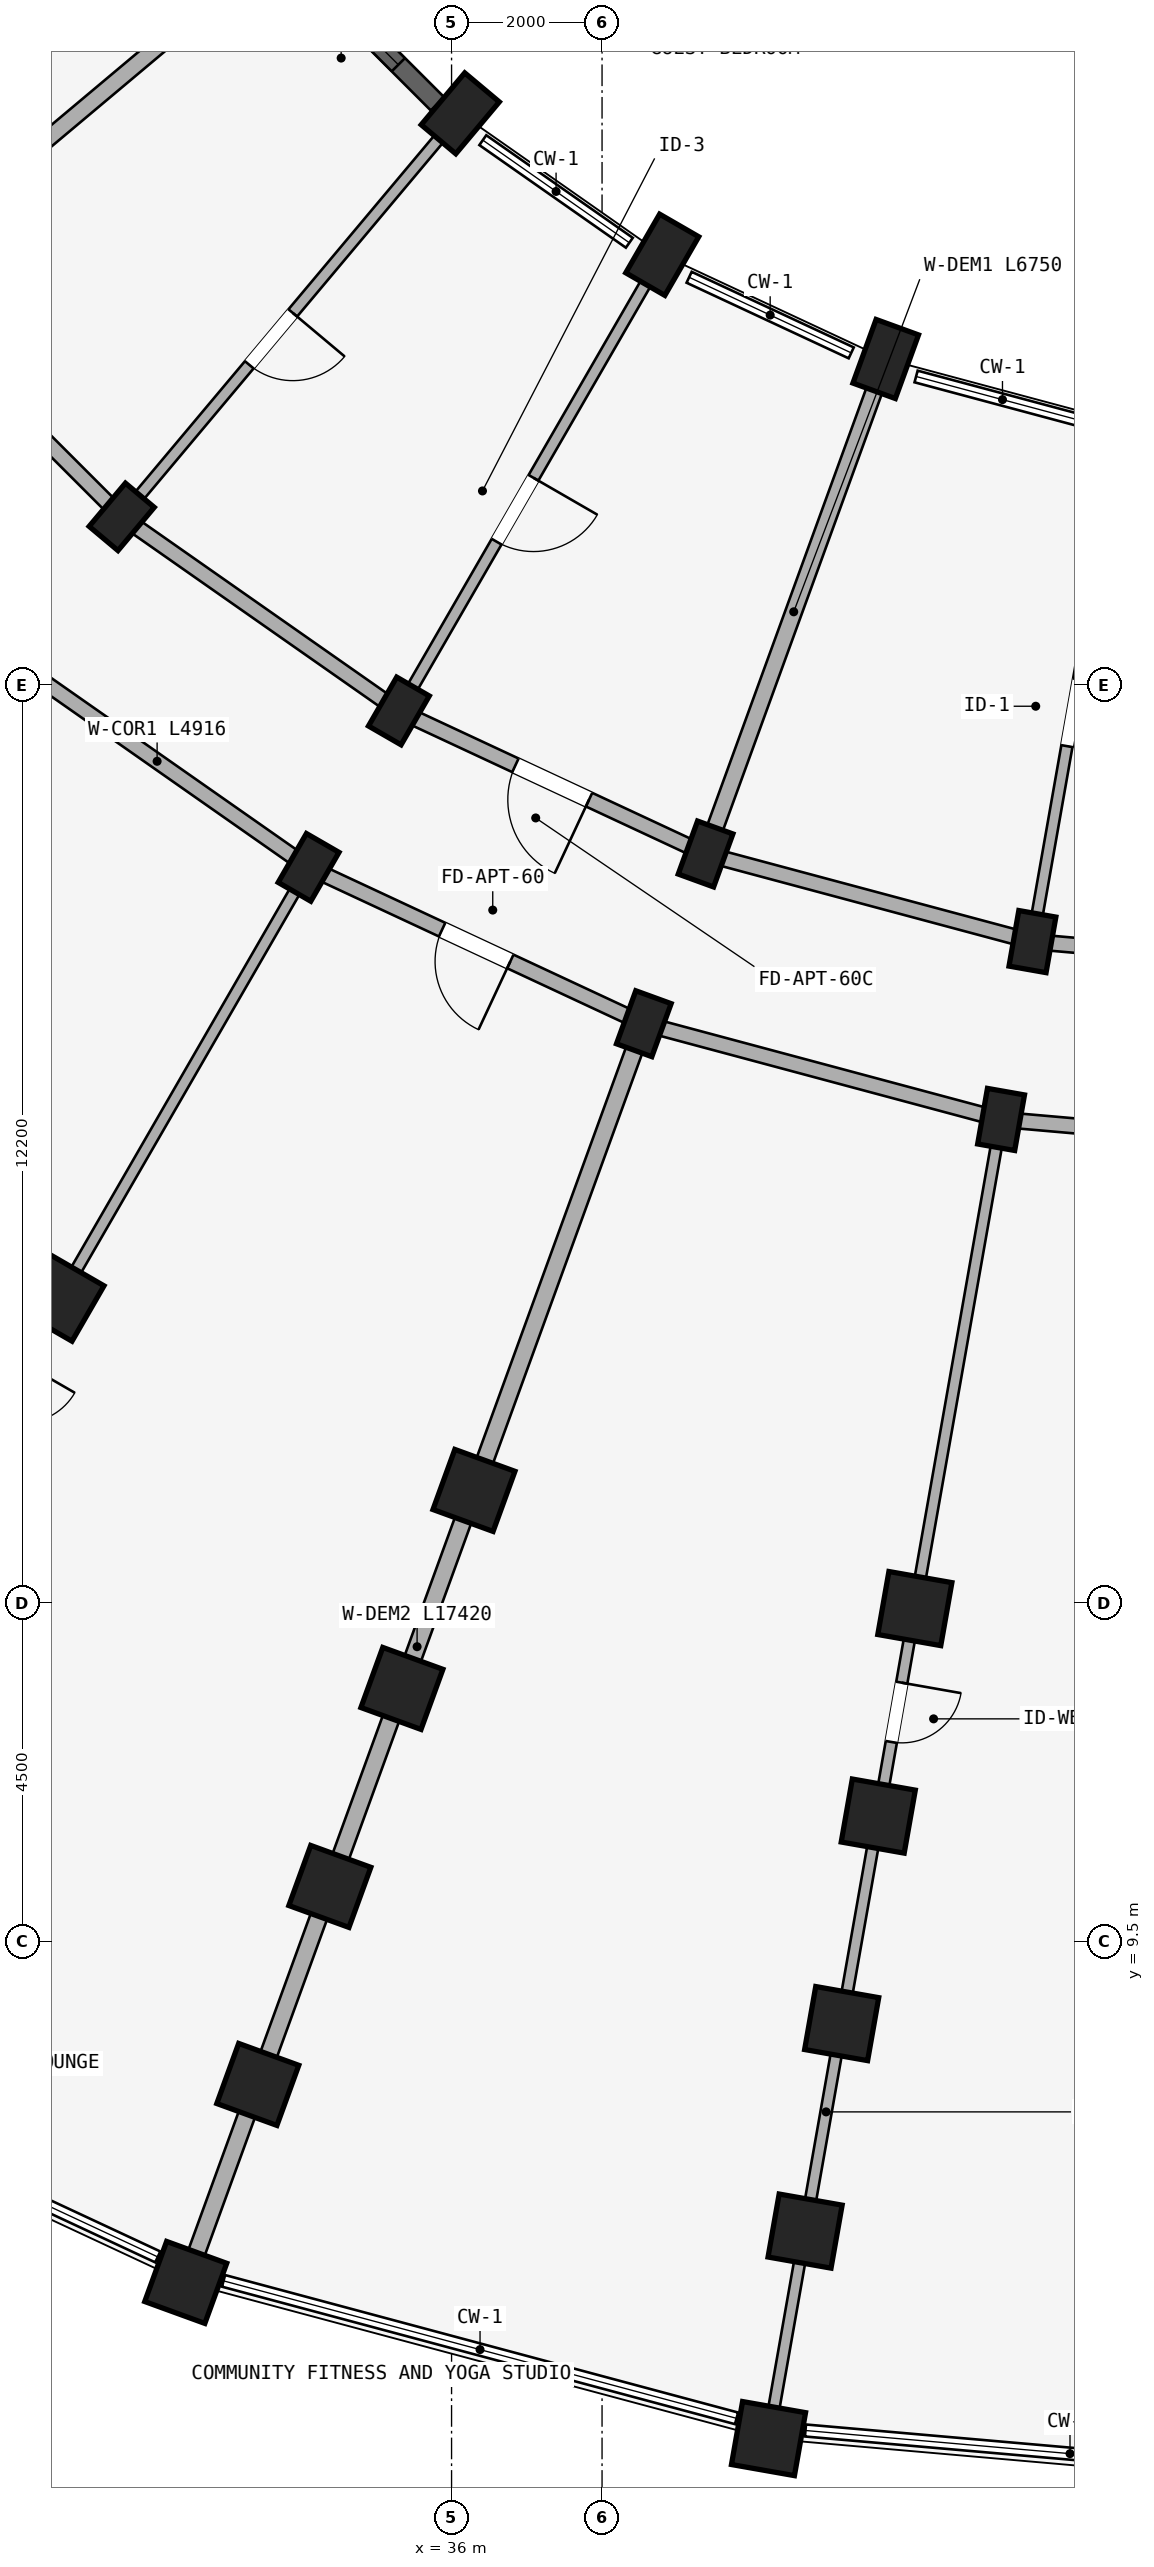
"""IFC4 building model, lengths in metres.
Left out: names, types, materials, properties, quantities, classifications, styles, units other than length and angle.
Written with IfcOpenShell. Run it as: python <this file> out.ifc"""

import sys

from ifc_helpers import new_model, si_unit, direction, frame, frame_2d, origin, origin_2d, place, context, subcontext, project, spatial, rectangle, extrude, element, fill, save


model = new_model("IFC4")
c1 = context("Model", 3, precision=1e-05, world=origin(), true_north=direction((0.0, 1.0)))
c2 = subcontext(c1, "Body", "Model", "MODEL_VIEW")
j1 = project(units=[si_unit("LENGTHUNIT", "METRE"), si_unit("PLANEANGLEUNIT", "RADIAN")], contexts=[c1])
p1 = place(None, origin())
s1 = spatial("IfcSite", under=j1, at=p1, CompositionType="ELEMENT")
p2 = place(p1, origin())
s2 = spatial("IfcBuilding", under=s1, at=p2, CompositionType="ELEMENT")
p3 = place(p2, frame((0.0, 0.0, 4.5)))
s3 = spatial("IfcBuildingStorey", under=s2, at=p3, CompositionType="ELEMENT", Elevation=4.5)
for number, where, z_axis, x_axis in (
    (1, (43.72, 22.792, 0.0), (0.0, 0.0, 1.0), (-0.985, 0.174, 0.0)),
    (2, (43.303, 20.428, 0.0), (0.0, 0.0, 1.0), (-0.985, 0.174, 0.0)),
):
    element("IfcColumn", number, at=place(p3, frame(where, z_axis=z_axis, x_axis=x_axis)), inside=s3, PredefinedType="COLUMN", context=c2, shape_type="SweptSolid", body=[
        extrude(rectangle(XDim=0.5, YDim=0.75, at=origin_2d()), origin(), (0.0, 0.0, 1.0), 3.98),
    ])
for number, where, z_axis, x_axis in (
    (3, (42.157, 13.929, 0.0), (0.0, 0.0, 1.0), (-0.985, 0.174, 0.0)),
    (4, (41.671, 11.171, 0.0), (0.0, 0.0, 1.0), (-0.985, 0.174, 0.0)),
    (5, (41.185, 8.414, 0.0), (0.0, 0.0, 1.0), (-0.985, 0.174, 0.0)),
    (6, (40.698, 5.656, 0.0), (0.0, 0.0, 1.0), (-0.985, 0.174, 0.0)),
    (7, (40.212, 2.899, 0.0), (0.0, 0.0, 1.0), (-0.985, 0.174, 0.0)),
):
    element("IfcColumn", number, at=place(p3, frame(where, z_axis=z_axis, x_axis=x_axis)), inside=s3, PredefinedType="COLUMN", context=c2, shape_type="SweptSolid", body=[
        extrude(rectangle(XDim=0.85, YDim=0.85, at=origin_2d()), origin(), (0.0, 0.0, 1.0), 3.98),
    ])
p4 = place(p3, frame((41.77, 30.534, 0.0), z_axis=(0.0, 0.0, 1.0), x_axis=(-0.939692620786, 0.342020143326, 0.0)))
e8 = element("IfcColumn", 8, at=p4, inside=s3, PredefinedType="COLUMN", context=c2, shape_type="SweptSolid", body=[
    extrude(rectangle(XDim=0.6, YDim=0.9, at=origin_2d()), origin(), (0.0, 0.0, 1.0), 3.98),
])
for number, where, z_axis, x_axis in (
    (9, (39.376, 23.956, 0.0), (0.0, 0.0, 1.0), (-0.94, 0.342, 0.0)),
    (10, (38.555, 21.701, 0.0), (0.0, 0.0, 1.0), (-0.94, 0.342, 0.0)),
):
    element("IfcColumn", number, at=place(p3, frame(where, z_axis=z_axis, x_axis=x_axis)), inside=s3, PredefinedType="COLUMN", context=c2, shape_type="SweptSolid", body=[
        extrude(rectangle(XDim=0.5, YDim=0.75, at=origin_2d()), origin(), (0.0, 0.0, 1.0), 3.98),
    ])
for number, where, z_axis, x_axis in (
    (11, (36.298, 15.499, 0.0), (0.0, 0.0, 1.0), (-0.94, 0.342, 0.0)),
    (12, (35.34, 12.868, 0.0), (0.0, 0.0, 1.0), (-0.94, 0.342, 0.0)),
    (13, (34.382, 10.236, 0.0), (0.0, 0.0, 1.0), (-0.94, 0.342, 0.0)),
    (14, (33.425, 7.605, 0.0), (0.0, 0.0, 1.0), (-0.94, 0.342, 0.0)),
    (15, (32.467, 4.974, 0.0), (0.0, 0.0, 1.0), (-0.94, 0.342, 0.0)),
):
    element("IfcColumn", number, at=place(p3, frame(where, z_axis=z_axis, x_axis=x_axis)), inside=s3, PredefinedType="COLUMN", context=c2, shape_type="SweptSolid", body=[
        extrude(rectangle(XDim=0.85, YDim=0.85, at=origin_2d()), origin(), (0.0, 0.0, 1.0), 3.98),
    ])
p5 = place(p3, frame((38.8, 31.919, 0.0), z_axis=(0.0, 0.0, 1.0), x_axis=(-0.866025403784, 0.5, 0.0)))
e16 = element("IfcColumn", 16, at=p5, inside=s3, PredefinedType="COLUMN", context=c2, shape_type="SweptSolid", body=[
    extrude(rectangle(XDim=0.6, YDim=0.9, at=origin_2d()), origin(), (0.0, 0.0, 1.0), 3.98),
])
for number, where, z_axis, x_axis in (
    (17, (35.3, 25.856, 0.0), (0.0, 0.0, 1.0), (-0.866, 0.5, 0.0)),
    (18, (34.1, 23.778, 0.0), (0.0, 0.0, 1.0), (-0.866, 0.5, 0.0)),
):
    element("IfcColumn", number, at=place(p3, frame(where, z_axis=z_axis, x_axis=x_axis)), inside=s3, PredefinedType="COLUMN", context=c2, shape_type="SweptSolid", body=[
        extrude(rectangle(XDim=0.5, YDim=0.75, at=origin_2d()), origin(), (0.0, 0.0, 1.0), 3.98),
    ])
p6 = place(p3, frame((30.8, 18.062, 0.0), z_axis=(0.0, 0.0, 1.0), x_axis=(-0.866025403784, 0.5, 0.0)))
e19 = element("IfcColumn", 19, at=p6, inside=s3, PredefinedType="COLUMN", context=c2, shape_type="SweptSolid", body=[
    extrude(rectangle(XDim=0.85, YDim=0.85, at=origin_2d()), origin(), (0.0, 0.0, 1.0), 3.98),
])
p7 = place(p3, frame((36.115, 33.798, 0.0), z_axis=(0.0, 0.0, 1.0), x_axis=(-0.766044443119, 0.642787609687, 0.0)))
e20 = element("IfcColumn", 20, at=p7, inside=s3, PredefinedType="COLUMN", context=c2, shape_type="SweptSolid", body=[
    extrude(rectangle(XDim=0.6, YDim=0.9, at=origin_2d()), origin(), (0.0, 0.0, 1.0), 3.98),
])
p8 = place(p3, frame((31.616, 28.436, 0.0), z_axis=(0.0, 0.0, 1.0), x_axis=(-0.766044443119, 0.642787609687, 0.0)))
e21 = element("IfcColumn", 21, at=p8, inside=s3, PredefinedType="COLUMN", context=c2, shape_type="SweptSolid", body=[
    extrude(rectangle(XDim=0.5, YDim=0.75, at=origin_2d()), origin(), (0.0, 0.0, 1.0), 3.98),
])
p9 = place(p3, frame((48.2, 22.4, 0.0), z_axis=(0.0, 0.0, 1.0), x_axis=(-0.996191949488, 0.087187153726, 0.0)))
e22 = element("IfcWall", 22, at=p9, inside=s3, PredefinedType="STANDARD", context=c2, shape_type="SweptSolid", body=[
    extrude(rectangle(XDim=4.497, YDim=0.2, at=frame_2d((2.249, 0.0))), origin(), (0.0, 0.0, 1.0), 3.322),
])
p10 = place(p9, frame((1.729, 0.0, 0.0)))
e23 = element("IfcOpeningElement", 23, at=p10, cuts=e22, PredefinedType="OPENING", context=c2, shape_type="SweptSolid", body=[
    extrude(rectangle(XDim=1.04, YDim=2.15, at=frame_2d((0.52, 1.075))), frame((0.0, 0.11, 0.0), z_axis=(0.0, -1.0, 0.0), x_axis=(1.0, 0.0, 0.0)), (0.0, 0.0, 1.0), 0.22),
])
p11 = place(p3, frame((48.2, 20.0, 0.0), z_axis=(0.0, 0.0, 1.0), x_axis=(-0.996193663584, 0.087167566415, 0.0)))
e24 = element("IfcWall", 24, at=p11, inside=s3, PredefinedType="STANDARD", context=c2, shape_type="SweptSolid", body=[
    extrude(rectangle(XDim=4.916, YDim=0.2, at=frame_2d((2.458, 0.0))), origin(), (0.0, 0.0, 1.0), 3.322),
])
p12 = place(p11, frame((1.888, 0.0, 0.0)))
e25 = element("IfcOpeningElement", 25, at=p12, cuts=e24, PredefinedType="OPENING", context=c2, shape_type="SweptSolid", body=[
    extrude(rectangle(XDim=1.14, YDim=2.15, at=frame_2d((0.57, 1.075))), frame((0.0, 0.11, 0.0), z_axis=(0.0, -1.0, 0.0), x_axis=(1.0, 0.0, 0.0)), (0.0, 0.0, 1.0), 0.22),
])
p13 = place(p3, frame((43.72, 22.792, 0.0), z_axis=(0.0, 0.0, 1.0), x_axis=(-0.965934240054, 0.258787642463, 0.0)))
e26 = element("IfcWall", 26, at=p13, inside=s3, PredefinedType="STANDARD", context=c2, shape_type="SweptSolid", body=[
    extrude(rectangle(XDim=4.497, YDim=0.2, at=frame_2d((2.249, 0.0))), origin(), (0.0, 0.0, 1.0), 3.322),
])
p14 = place(p3, frame((43.303, 20.428, 0.0), z_axis=(0.0, 0.0, 1.0), x_axis=(-0.965930095386, 0.258803112091, 0.0)))
e27 = element("IfcWall", 27, at=p14, inside=s3, PredefinedType="STANDARD", context=c2, shape_type="SweptSolid", body=[
    extrude(rectangle(XDim=4.916, YDim=0.2, at=frame_2d((2.458, 0.0))), origin(), (0.0, 0.0, 1.0), 3.322),
])
p15 = place(p3, frame((39.376, 23.956, 0.0), z_axis=(0.0, 0.0, 1.0), x_axis=(-0.906307919131, 0.422617978463, 0.0)))
e28 = element("IfcWall", 28, at=p15, inside=s3, PredefinedType="STANDARD", context=c2, shape_type="SweptSolid", body=[
    extrude(rectangle(XDim=4.497, YDim=0.2, at=frame_2d((2.249, 0.0))), origin(), (0.0, 0.0, 1.0), 3.322),
])
p16 = place(p15, frame((1.709, 0.0, 0.0)))
e29 = element("IfcOpeningElement", 29, at=p16, cuts=e28, PredefinedType="OPENING", context=c2, shape_type="SweptSolid", body=[
    extrude(rectangle(XDim=1.08, YDim=2.15, at=frame_2d((0.54, 1.075))), frame((0.0, 0.11, 0.0), z_axis=(0.0, -1.0, 0.0), x_axis=(1.0, 0.0, 0.0)), (0.0, 0.0, 1.0), 0.22),
])
p17 = place(p3, frame((38.555, 21.701, 0.0), z_axis=(0.0, 0.0, 1.0), x_axis=(-0.906302381024, 0.422629854778, 0.0)))
e30 = element("IfcWall", 30, at=p17, inside=s3, PredefinedType="STANDARD", context=c2, shape_type="SweptSolid", body=[
    extrude(rectangle(XDim=4.915, YDim=0.2, at=frame_2d((2.458, 0.0))), origin(), (0.0, 0.0, 1.0), 3.322),
])
p18 = place(p17, frame((1.958, 0.0, 0.0)))
e31 = element("IfcOpeningElement", 31, at=p18, cuts=e30, PredefinedType="OPENING", context=c2, shape_type="SweptSolid", body=[
    extrude(rectangle(XDim=1.0, YDim=2.15, at=frame_2d((0.5, 1.075))), frame((0.0, 0.11, 0.0), z_axis=(0.0, -1.0, 0.0), x_axis=(1.0, 0.0, 0.0)), (0.0, 0.0, 1.0), 0.22),
])
p19 = place(p3, frame((35.3, 25.856, 0.0), z_axis=(0.0, 0.0, 1.0), x_axis=(-0.819155404658, 0.573571637217, 0.0)))
e32 = element("IfcWall", 32, at=p19, inside=s3, PredefinedType="STANDARD", context=c2, shape_type="SweptSolid", body=[
    extrude(rectangle(XDim=4.497, YDim=0.2, at=frame_2d((2.249, 0.0))), origin(), (0.0, 0.0, 1.0), 3.322),
])
p20 = place(p3, frame((34.1, 23.778, 0.0), z_axis=(0.0, 0.0, 1.0), x_axis=(-0.819140911474, 0.573592335331, 0.0)))
e33 = element("IfcWall", 33, at=p20, inside=s3, PredefinedType="STANDARD", context=c2, shape_type="SweptSolid", body=[
    extrude(rectangle(XDim=4.916, YDim=0.2, at=frame_2d((2.458, 0.0))), origin(), (0.0, 0.0, 1.0), 3.322),
])
p21 = place(p3, frame((31.616, 28.436, 0.0), z_axis=(0.0, 0.0, 1.0), x_axis=(-0.707106781187, 0.707106781187, 0.0)))
e34 = element("IfcWall", 34, at=p21, inside=s3, PredefinedType="STANDARD", context=c2, shape_type="SweptSolid", body=[
    extrude(rectangle(XDim=4.497, YDim=0.2, at=frame_2d((2.249, 0.0))), origin(), (0.0, 0.0, 1.0), 3.322),
])
p22 = place(p3, frame((44.901, 29.489, 0.0), z_axis=(0.0, 0.0, 1.0), x_axis=(-0.173647089161, -0.984807944945, 0.0)))
e35 = element("IfcWall", 35, at=p22, inside=s3, PredefinedType="PARTITIONING", context=c2, shape_type="SweptSolid", body=[
    extrude(rectangle(XDim=6.75, YDim=0.15, at=frame_2d((3.375, 0.0))), origin(), (0.0, 0.0, 1.0), 3.322),
])
p23 = place(p22, frame((3.262, 0.0, 0.0)))
e36 = element("IfcOpeningElement", 36, at=p23, cuts=e35, PredefinedType="OPENING", context=c2, shape_type="SweptSolid", body=[
    extrude(rectangle(XDim=0.9, YDim=2.1, at=frame_2d((0.45, 1.05))), frame((0.0, 0.085, 0.0), z_axis=(0.0, -1.0, 0.0), x_axis=(1.0, 0.0, 0.0)), (0.0, 0.0, 1.0), 0.17),
])
p24 = place(p3, frame((43.286, 20.33, 0.0), z_axis=(0.0, 0.0, 1.0), x_axis=(-0.173646216546, -0.984808098809, 0.0)))
e37 = element("IfcWall", 37, at=p24, inside=s3, PredefinedType="PARTITIONING", context=c2, shape_type="SweptSolid", body=[
    extrude(rectangle(XDim=17.42, YDim=0.15, at=frame_2d((8.71, 0.0))), origin(), (0.0, 0.0, 1.0), 3.322),
])
p25 = place(p24, frame((7.5, 0.0, 0.0)))
e38 = element("IfcOpeningElement", 38, at=p25, cuts=e37, PredefinedType="OPENING", context=c2, shape_type="SweptSolid", body=[
    extrude(rectangle(XDim=0.8, YDim=2.1, at=frame_2d((0.4, 1.05))), frame((0.0, 0.085, 0.0), z_axis=(0.0, -1.0, 0.0), x_axis=(1.0, 0.0, 0.0)), (0.0, 0.0, 1.0), 0.17),
])
p26 = place(p3, frame((41.702, 30.346, 0.0), z_axis=(0.0, 0.0, 1.0), x_axis=(-0.342010221662, -0.939696231917, 0.0)))
e39 = element("IfcWall", 39, at=p26, inside=s3, PredefinedType="STANDARD", context=c2, shape_type="SweptSolid", body=[
    extrude(rectangle(XDim=6.75, YDim=0.22, at=frame_2d((3.375, 0.0))), origin(), (0.0, 0.0, 1.0), 3.322),
])
p27 = place(p3, frame((38.521, 21.607, 0.0), z_axis=(0.0, 0.0, 1.0), x_axis=(-0.342022120477, -0.939691901159, 0.0)))
e40 = element("IfcWall", 40, at=p27, inside=s3, PredefinedType="STANDARD", context=c2, shape_type="SweptSolid", body=[
    extrude(rectangle(XDim=17.42, YDim=0.23, at=frame_2d((8.71, 0.0))), origin(), (0.0, 0.0, 1.0), 3.322),
])
p28 = place(p3, frame((38.7, 31.746, 0.0), z_axis=(0.0, 0.0, 1.0), x_axis=(-0.499997969693, -0.866026575979, 0.0)))
e41 = element("IfcWall", 41, at=p28, inside=s3, PredefinedType="PARTITIONING", context=c2, shape_type="SweptSolid", body=[
    extrude(rectangle(XDim=6.75, YDim=0.15, at=frame_2d((3.375, 0.0))), origin(), (0.0, 0.0, 1.0), 3.322),
])
p29 = place(p28, frame((3.222, 0.0, 0.0)))
e42 = element("IfcOpeningElement", 42, at=p29, cuts=e41, PredefinedType="OPENING", context=c2, shape_type="SweptSolid", body=[
    extrude(rectangle(XDim=0.98, YDim=2.12, at=frame_2d((0.49, 1.06))), frame((0.0, 0.085, 0.0), z_axis=(0.0, -1.0, 0.0), x_axis=(1.0, 0.0, 0.0)), (0.0, 0.0, 1.0), 0.17),
])
p30 = place(p3, frame((34.05, 23.691, 0.0), z_axis=(0.0, 0.0, 1.0), x_axis=(-0.499997843263, -0.866026648973, 0.0)))
e43 = element("IfcWall", 43, at=p30, inside=s3, PredefinedType="PARTITIONING", context=c2, shape_type="SweptSolid", body=[
    extrude(rectangle(XDim=17.42, YDim=0.15, at=frame_2d((8.71, 0.0))), origin(), (0.0, 0.0, 1.0), 3.322),
])
p31 = place(p30, frame((7.5, 0.0, 0.0)))
e44 = element("IfcOpeningElement", 44, at=p31, cuts=e43, PredefinedType="OPENING", context=c2, shape_type="SweptSolid", body=[
    extrude(rectangle(XDim=0.8, YDim=2.1, at=frame_2d((0.4, 1.05))), frame((0.0, 0.085, 0.0), z_axis=(0.0, -1.0, 0.0), x_axis=(1.0, 0.0, 0.0)), (0.0, 0.0, 1.0), 0.17),
])
p32 = place(p3, frame((35.987, 33.645, 0.0), z_axis=(0.0, 0.0, 1.0), x_axis=(-0.642784846501, -0.766046761698, 0.0)))
e45 = element("IfcWall", 45, at=p32, inside=s3, PredefinedType="PARTITIONING", context=c2, shape_type="SweptSolid", body=[
    extrude(rectangle(XDim=6.75, YDim=0.15, at=frame_2d((3.375, 0.0))), origin(), (0.0, 0.0, 1.0), 3.322),
])
p33 = place(p32, frame((3.262, 0.0, 0.0)))
e46 = element("IfcOpeningElement", 46, at=p33, cuts=e45, PredefinedType="OPENING", context=c2, shape_type="SweptSolid", body=[
    extrude(rectangle(XDim=0.9, YDim=2.1, at=frame_2d((0.45, 1.05))), frame((0.0, 0.085, 0.0), z_axis=(0.0, -1.0, 0.0), x_axis=(1.0, 0.0, 0.0)), (0.0, 0.0, 1.0), 0.17),
])
p34 = place(p3, frame((33.645, 35.987, 0.0), z_axis=(0.0, 0.0, 1.0), x_axis=(-0.766046761698, -0.642784846501, 0.0)))
e47 = element("IfcWall", 47, at=p34, inside=s3, PredefinedType="STANDARD", context=c2, shape_type="SweptSolid", body=[
    extrude(rectangle(XDim=6.75, YDim=0.22, at=frame_2d((3.375, 0.0))), origin(), (0.0, 0.0, 1.0), 3.322),
])
p35 = place(p3, frame((35.812, 33.925, 0.0), z_axis=(0.0, 0.0, 1.0), x_axis=(-0.707106781187, 0.707106781187, 0.0)))
e48 = element("IfcWall", 48, at=p35, inside=s3, PredefinedType="STANDARD", context=c2, shape_type="SweptSolid", body=[
    extrude(rectangle(XDim=2.67, YDim=0.25, at=frame_2d((1.335, 0.0))), origin(), (0.0, 0.0, 1.0), 3.472),
])
p36 = place(p35, frame((0.735, 0.0, 0.88)))
e49 = element("IfcOpeningElement", 49, at=p36, cuts=e48, PredefinedType="OPENING", context=c2, shape_type="SweptSolid", body=[
    extrude(rectangle(XDim=1.2, YDim=1.5, at=frame_2d((0.6, 0.75))), frame((0.0, 0.135, 0.0), z_axis=(0.0, -1.0, 0.0), x_axis=(1.0, 0.0, 0.0)), (0.0, 0.0, 1.0), 0.27),
])
p37 = place(p36, origin())
e50 = element("IfcWindow", 50, at=p37, inside=s3, PartitioningType="SINGLE_PANEL", PredefinedType="WINDOW", context=c2, shape_type="SweptSolid", body=[
    extrude(rectangle(XDim=1.2, YDim=1.5, at=frame_2d((0.6, 0.75))), frame((0.0, 0.03, 0.0), z_axis=(0.0, -1.0, 0.0), x_axis=(1.0, 0.0, 0.0)), (0.0, 0.0, 1.0), 0.06),
])
fill(e49, e50)
p38 = place(p23, origin())
e51 = element("IfcDoor", 51, at=p38, inside=s3, OperationType="SINGLE_SWING_LEFT", PredefinedType="DOOR", context=c2, shape_type="SweptSolid", body=[
    extrude(rectangle(XDim=0.9, YDim=2.1, at=frame_2d((0.45, 1.05))), frame((0.0, 0.025, 0.0), z_axis=(0.0, -1.0, 0.0), x_axis=(1.0, 0.0, 0.0)), (0.0, 0.0, 1.0), 0.05),
])
fill(e36, e51)
p39 = place(p25, frame((0.8, 0.0, 0.0), z_axis=(0.0, 0.0, 1.0), x_axis=(-1.0, 0.0, 0.0)))
e52 = element("IfcDoor", 52, at=p39, inside=s3, OperationType="SINGLE_SWING_RIGHT", PredefinedType="DOOR", context=c2, shape_type="SweptSolid", body=[
    extrude(rectangle(XDim=0.8, YDim=2.1, at=frame_2d((0.4, 1.05))), frame((0.0, 0.025, 0.0), z_axis=(0.0, -1.0, 0.0), x_axis=(1.0, 0.0, 0.0)), (0.0, 0.0, 1.0), 0.05),
])
fill(e38, e52)
p40 = place(p29, origin())
e53 = element("IfcDoor", 53, at=p40, inside=s3, OperationType="SINGLE_SWING_LEFT", PredefinedType="DOOR", context=c2, shape_type="SweptSolid", body=[
    extrude(rectangle(XDim=0.98, YDim=2.12, at=frame_2d((0.49, 1.06))), frame((0.0, 0.025, 0.0), z_axis=(0.0, -1.0, 0.0), x_axis=(1.0, 0.0, 0.0)), (0.0, 0.0, 1.0), 0.05),
])
fill(e42, e53)
p41 = place(p33, origin())
e54 = element("IfcDoor", 54, at=p41, inside=s3, OperationType="SINGLE_SWING_LEFT", PredefinedType="DOOR", context=c2, shape_type="SweptSolid", body=[
    extrude(rectangle(XDim=0.9, YDim=2.1, at=frame_2d((0.45, 1.05))), frame((0.0, 0.025, 0.0), z_axis=(0.0, -1.0, 0.0), x_axis=(1.0, 0.0, 0.0)), (0.0, 0.0, 1.0), 0.05),
])
fill(e46, e54)
p42 = place(p18, origin())
e55 = element("IfcDoor", 55, at=p42, inside=s3, OperationType="SINGLE_SWING_LEFT", PredefinedType="DOOR", context=c2, shape_type="SweptSolid", body=[
    extrude(rectangle(XDim=1.0, YDim=2.15, at=frame_2d((0.5, 1.075))), frame((0.0, 0.025, 0.0), z_axis=(0.0, -1.0, 0.0), x_axis=(1.0, 0.0, 0.0)), (0.0, 0.0, 1.0), 0.05),
])
fill(e31, e55)
p43 = place(p16, frame((1.08, 0.0, 0.0), z_axis=(0.0, 0.0, 1.0), x_axis=(-1.0, 0.0, 0.0)))
e56 = element("IfcDoor", 56, at=p43, inside=s3, OperationType="SINGLE_SWING_RIGHT", PredefinedType="DOOR", context=c2, shape_type="SweptSolid", body=[
    extrude(rectangle(XDim=1.08, YDim=2.15, at=frame_2d((0.54, 1.075))), frame((0.0, 0.025, 0.0), z_axis=(0.0, -1.0, 0.0), x_axis=(1.0, 0.0, 0.0)), (0.0, 0.0, 1.0), 0.05),
])
fill(e29, e56)
save(model, sys.argv[1])
